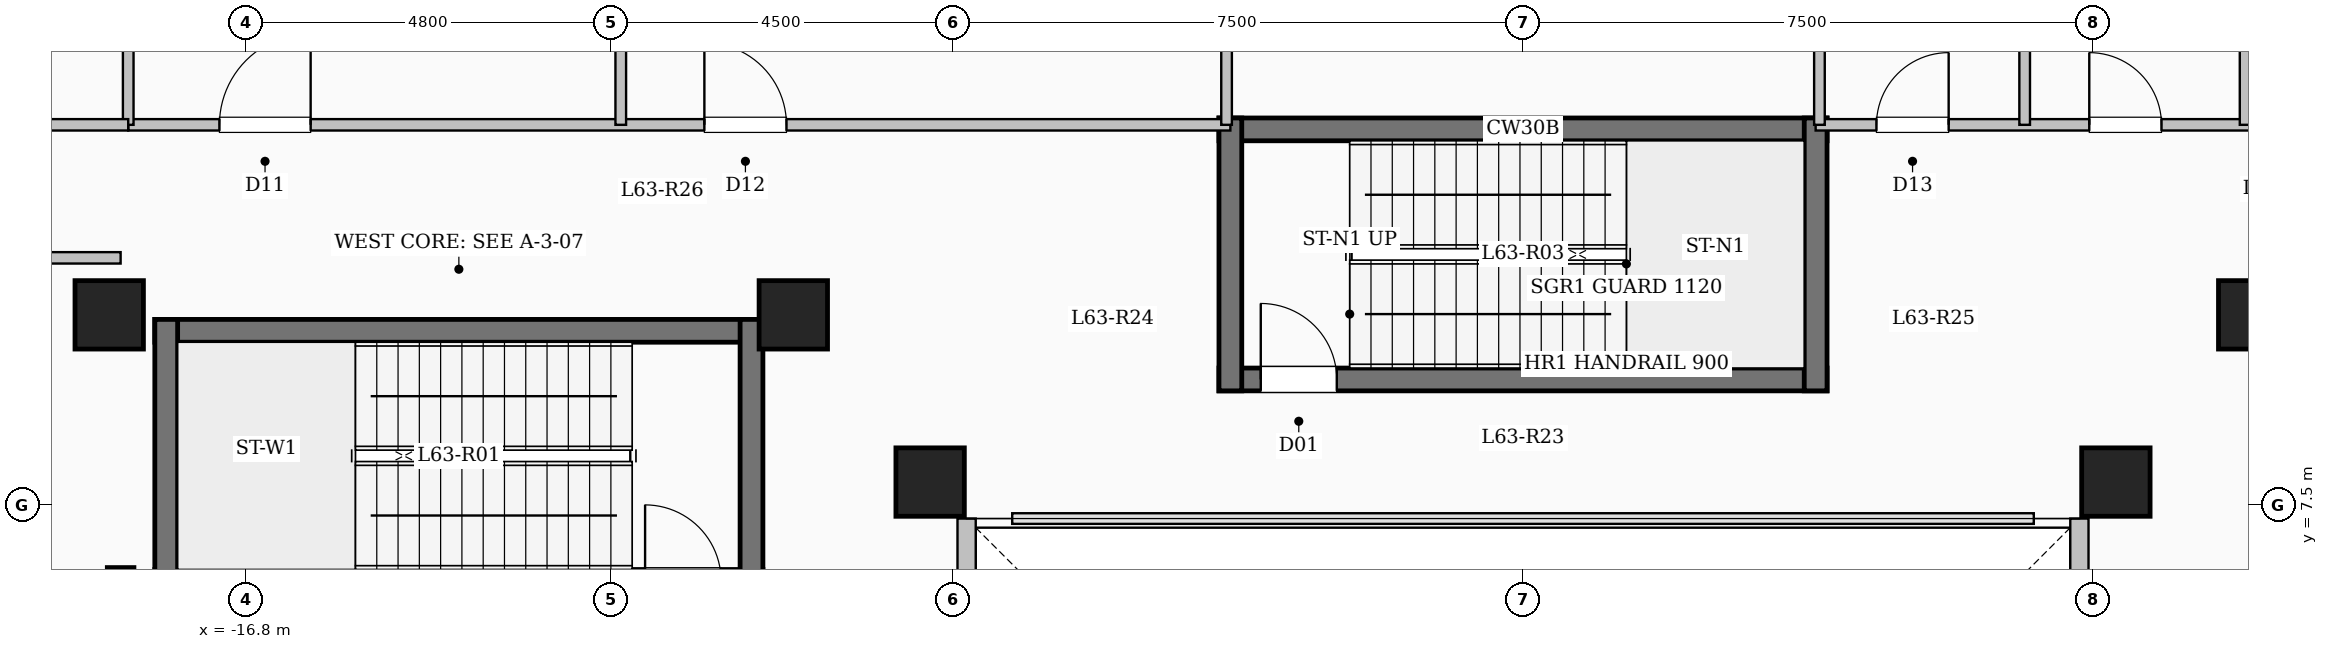
"""IFC4 building model, lengths in metres.
Left out: names, types, materials, properties, quantities, classifications, styles, units other than length and angle.
Written with IfcOpenShell. Run it as: python <this file> out.ifc"""

import sys

from ifc_helpers import new_model, si_unit, direction, frame, frame_2d, origin, origin_2d, place, context, subcontext, project, spatial, rectangle, extrude, element, fill, save


model = new_model("IFC4")
c1 = context("Model", 3, precision=1e-05, world=origin(), true_north=direction((0.0, 1.0)))
c2 = subcontext(c1, "Body", "Model", "MODEL_VIEW")
j1 = project(units=[si_unit("LENGTHUNIT", "METRE"), si_unit("PLANEANGLEUNIT", "RADIAN")], contexts=[c1])
p1 = place(None, origin())
s1 = spatial("IfcSite", under=j1, at=p1, CompositionType="ELEMENT")
p2 = place(p1, origin())
s2 = spatial("IfcBuilding", under=s1, at=p2, CompositionType="ELEMENT")
p3 = place(p2, frame((0.0, 0.0, 231.75)))
s3 = spatial("IfcBuildingStorey", under=s2, at=p3, CompositionType="ELEMENT", Elevation=231.75)
for number, where, z_axis, x_axis in (
    (1, (-7.8, 7.8, 0.0), (0.0, 0.0, 1.0), (1.0, 0.0, 0.0)),
    (2, (7.8, 7.8, 0.0), (0.0, 0.0, 1.0), (1.0, 0.0, 0.0)),
    (3, (-9.6, 10.0, 0.0), (0.0, 0.0, 1.0), (1.0, 0.0, 0.0)),
    (4, (9.6, 10.0, 0.0), (0.0, 0.0, 1.0), (1.0, 0.0, 0.0)),
    (5, (-18.6, 10.0, 0.0), (0.0, 0.0, 1.0), (1.0, 0.0, 0.0)),
):
    element("IfcColumn", number, at=place(p3, frame(where, z_axis=z_axis, x_axis=x_axis)), inside=s3, PredefinedType="COLUMN", context=c2, shape_type="SweptSolid", body=[
        extrude(rectangle(XDim=0.9, YDim=0.9, at=origin_2d()), origin(), (0.0, 0.0, 1.0), 4.65),
    ])
p4 = place(p3, frame((7.32, -7.32, 0.0), z_axis=(0.0, 0.0, 1.0), x_axis=(0.0, 1.0, 0.0)))
e6 = element("IfcWall", 6, at=p4, inside=s3, PredefinedType="SOLIDWALL", context=c2, shape_type="SweptSolid", body=[
    extrude(rectangle(XDim=14.64, YDim=0.24, at=frame_2d((7.32, 0.0))), origin(), (0.0, 0.0, 1.0), 4.35),
])
p5 = place(p4, frame((6.62, 0.0, 0.95)))
e7 = element("IfcOpeningElement", 7, at=p5, cuts=e6, PredefinedType="OPENING", context=c2, shape_type="SweptSolid", body=[
    extrude(rectangle(XDim=1.4, YDim=1.5, at=frame_2d((0.7, 0.75))), frame((0.0, 0.13, 0.0), z_axis=(0.0, -1.0, 0.0), x_axis=(1.0, 0.0, 0.0)), (0.0, 0.0, 1.0), 0.26),
])
p6 = place(p3, frame((-7.32, 7.32, 0.0), z_axis=(0.0, 0.0, 1.0), x_axis=(0.0, -1.0, 0.0)))
e8 = element("IfcWall", 8, at=p6, inside=s3, PredefinedType="SOLIDWALL", context=c2, shape_type="SweptSolid", body=[
    extrude(rectangle(XDim=14.64, YDim=0.24, at=frame_2d((7.32, 0.0))), origin(), (0.0, 0.0, 1.0), 4.35),
])
p7 = place(p6, frame((6.62, 0.0, 0.95)))
e9 = element("IfcOpeningElement", 9, at=p7, cuts=e8, PredefinedType="OPENING", context=c2, shape_type="SweptSolid", body=[
    extrude(rectangle(XDim=1.4, YDim=1.5, at=frame_2d((0.7, 0.75))), frame((0.0, 0.13, 0.0), z_axis=(0.0, -1.0, 0.0), x_axis=(1.0, 0.0, 0.0)), (0.0, 0.0, 1.0), 0.26),
])
p8 = place(p3, frame((-18.0, 9.79, 0.0), z_axis=(0.0, 0.0, 1.0), x_axis=(1.0, 0.0, 0.0)))
e10 = element("IfcWall", 10, at=p8, inside=s3, PredefinedType="SHEAR", context=c2, shape_type="SweptSolid", body=[
    extrude(rectangle(XDim=8.0, YDim=0.3, at=frame_2d((4.0, 0.0))), origin(), (0.0, 0.0, 1.0), 4.65),
])
p9 = place(p3, frame((-18.0, 6.5, 0.0), z_axis=(0.0, 0.0, 1.0), x_axis=(1.0, 0.0, 0.0)))
e11 = element("IfcWall", 11, at=p9, inside=s3, PredefinedType="SHEAR", context=c2, shape_type="SweptSolid", body=[
    extrude(rectangle(XDim=8.0, YDim=0.3, at=frame_2d((4.0, 0.0))), origin(), (0.0, 0.0, 1.0), 4.65),
])
p10 = place(p9, frame((6.45, 0.0, 0.0)))
e12 = element("IfcOpeningElement", 12, at=p10, cuts=e11, PredefinedType="OPENING", context=c2, shape_type="SweptSolid", body=[
    extrude(rectangle(XDim=1.0, YDim=2.15, at=frame_2d((0.5, 1.075))), frame((0.0, 0.16, 0.0), z_axis=(0.0, -1.0, 0.0), x_axis=(1.0, 0.0, 0.0)), (0.0, 0.0, 1.0), 0.32),
])
for number, where, z_axis, x_axis in (
    (13, (-17.85, 6.35, 0.0), (0.0, 0.0, 1.0), (0.0, 1.0, 0.0)),
    (14, (-10.15, 6.35, 0.0), (0.0, 0.0, 1.0), (0.0, 1.0, 0.0)),
):
    element("IfcWall", number, at=place(p3, frame(where, z_axis=z_axis, x_axis=x_axis)), inside=s3, PredefinedType="SHEAR", context=c2, shape_type="SweptSolid", body=[
        extrude(rectangle(XDim=3.59, YDim=0.3, at=frame_2d((1.795, 0.0))), origin(), (0.0, 0.0, 1.0), 4.65),
    ])
p11 = place(p3, frame((-4.0, 12.44, 0.0), z_axis=(0.0, 0.0, 1.0), x_axis=(1.0, 0.0, 0.0)))
e15 = element("IfcWall", 15, at=p11, inside=s3, PredefinedType="SHEAR", context=c2, shape_type="SweptSolid", body=[
    extrude(rectangle(XDim=8.0, YDim=0.3, at=frame_2d((4.0, 0.0))), origin(), (0.0, 0.0, 1.0), 4.65),
])
p12 = place(p3, frame((-4.0, 9.15, 0.0), z_axis=(0.0, 0.0, 1.0), x_axis=(1.0, 0.0, 0.0)))
e16 = element("IfcWall", 16, at=p12, inside=s3, PredefinedType="SHEAR", context=c2, shape_type="SweptSolid", body=[
    extrude(rectangle(XDim=8.0, YDim=0.3, at=frame_2d((4.0, 0.0))), origin(), (0.0, 0.0, 1.0), 4.65),
])
p13 = place(p12, frame((0.55, 0.0, 0.0)))
e17 = element("IfcOpeningElement", 17, at=p13, cuts=e16, PredefinedType="OPENING", context=c2, shape_type="SweptSolid", body=[
    extrude(rectangle(XDim=1.0, YDim=2.15, at=frame_2d((0.5, 1.075))), frame((0.0, 0.16, 0.0), z_axis=(0.0, -1.0, 0.0), x_axis=(1.0, 0.0, 0.0)), (0.0, 0.0, 1.0), 0.32),
])
for number, where, z_axis, x_axis in (
    (18, (-3.85, 9.0, 0.0), (0.0, 0.0, 1.0), (0.0, 1.0, 0.0)),
    (19, (3.85, 9.0, 0.0), (0.0, 0.0, 1.0), (0.0, 1.0, 0.0)),
):
    element("IfcWall", number, at=place(p3, frame(where, z_axis=z_axis, x_axis=x_axis)), inside=s3, PredefinedType="SHEAR", context=c2, shape_type="SweptSolid", body=[
        extrude(rectangle(XDim=3.59, YDim=0.3, at=frame_2d((1.795, 0.0))), origin(), (0.0, 0.0, 1.0), 4.65),
    ])
p14 = place(p3, frame((-18.45, -7.375, 0.0), z_axis=(0.0, 0.0, 1.0), x_axis=(0.0, 1.0, 0.0)))
e20 = element("IfcWall", 20, at=p14, inside=s3, PredefinedType="SHEAR", context=c2, shape_type="SweptSolid", body=[
    extrude(rectangle(XDim=14.05, YDim=0.35, at=frame_2d((7.025, 0.0))), origin(), (0.0, 0.0, 1.0), 4.65),
])
p15 = place(p3, frame((-18.35, 12.5, 0.0), z_axis=(0.0, 0.0, 1.0), x_axis=(1.0, 0.0, 0.0)))
e21 = element("IfcWall", 21, at=p15, inside=s3, PredefinedType="PARTITIONING", context=c2, shape_type="SweptSolid", body=[
    extrude(rectangle(XDim=14.5, YDim=0.15, at=frame_2d((7.25, 0.0))), origin(), (0.0, 0.0, 1.0), 4.35),
])
p16 = place(p15, frame((1.2, 0.0, 0.0)))
e22 = element("IfcOpeningElement", 22, at=p16, cuts=e21, PredefinedType="OPENING", context=c2, shape_type="SweptSolid", body=[
    extrude(rectangle(XDim=1.2, YDim=2.15, at=frame_2d((0.6, 1.075))), frame((0.0, 0.085, 0.0), z_axis=(0.0, -1.0, 0.0), x_axis=(1.0, 0.0, 0.0)), (0.0, 0.0, 1.0), 0.17),
])
p17 = place(p15, frame((7.58, 0.0, 0.0)))
e23 = element("IfcOpeningElement", 23, at=p17, cuts=e21, PredefinedType="OPENING", context=c2, shape_type="SweptSolid", body=[
    extrude(rectangle(XDim=1.08, YDim=2.15, at=frame_2d((0.54, 1.075))), frame((0.0, 0.085, 0.0), z_axis=(0.0, -1.0, 0.0), x_axis=(1.0, 0.0, 0.0)), (0.0, 0.0, 1.0), 0.17),
])
p18 = place(p3, frame((3.85, 12.5, 0.0), z_axis=(0.0, 0.0, 1.0), x_axis=(1.0, 0.0, 0.0)))
e24 = element("IfcWall", 24, at=p18, inside=s3, PredefinedType="PARTITIONING", context=c2, shape_type="SweptSolid", body=[
    extrude(rectangle(XDim=14.5, YDim=0.15, at=frame_2d((7.25, 0.0))), origin(), (0.0, 0.0, 1.0), 4.35),
])
p19 = place(p18, frame((0.8, 0.0, 0.0)))
e25 = element("IfcOpeningElement", 25, at=p19, cuts=e24, PredefinedType="OPENING", context=c2, shape_type="SweptSolid", body=[
    extrude(rectangle(XDim=0.95, YDim=2.15, at=frame_2d((0.475, 1.075))), frame((0.0, 0.085, 0.0), z_axis=(0.0, -1.0, 0.0), x_axis=(1.0, 0.0, 0.0)), (0.0, 0.0, 1.0), 0.17),
])
p20 = place(p18, frame((3.6, 0.0, 0.0)))
e26 = element("IfcOpeningElement", 26, at=p20, cuts=e24, PredefinedType="OPENING", context=c2, shape_type="SweptSolid", body=[
    extrude(rectangle(XDim=0.95, YDim=2.15, at=frame_2d((0.475, 1.075))), frame((0.0, 0.085, 0.0), z_axis=(0.0, -1.0, 0.0), x_axis=(1.0, 0.0, 0.0)), (0.0, 0.0, 1.0), 0.17),
])
p21 = place(p18, frame((6.55, 0.0, 0.0)))
e27 = element("IfcOpeningElement", 27, at=p21, cuts=e24, PredefinedType="OPENING", context=c2, shape_type="SweptSolid", body=[
    extrude(rectangle(XDim=1.08, YDim=2.15, at=frame_2d((0.54, 1.075))), frame((0.0, 0.085, 0.0), z_axis=(0.0, -1.0, 0.0), x_axis=(1.0, 0.0, 0.0)), (0.0, 0.0, 1.0), 0.17),
])
p22 = place(p18, frame((10.29, 0.0, 0.0)))
e28 = element("IfcOpeningElement", 28, at=p22, cuts=e24, PredefinedType="OPENING", context=c2, shape_type="SweptSolid", body=[
    extrude(rectangle(XDim=1.2, YDim=2.15, at=frame_2d((0.6, 1.075))), frame((0.0, 0.085, 0.0), z_axis=(0.0, -1.0, 0.0), x_axis=(1.0, 0.0, 0.0)), (0.0, 0.0, 1.0), 0.17),
])
for number, where, z_axis, x_axis in (
    (29, (-3.9, 12.5, 0.0), (0.0, 0.0, 1.0), (0.0, 1.0, 0.0)),
    (30, (3.9, 12.5, 0.0), (0.0, 0.0, 1.0), (0.0, 1.0, 0.0)),
):
    element("IfcWall", number, at=place(p3, frame(where, z_axis=z_axis, x_axis=x_axis)), inside=s3, PredefinedType="PARTITIONING", context=c2, shape_type="SweptSolid", body=[
        extrude(rectangle(XDim=9.88, YDim=0.14, at=frame_2d((4.94, 0.0))), origin(), (0.0, 0.0, 1.0), 4.35),
    ])
p23 = place(p3, frame((-11.87, 12.5, 0.0), z_axis=(0.0, 0.0, 1.0), x_axis=(0.0, 1.0, 0.0)))
e31 = element("IfcWall", 31, at=p23, inside=s3, PredefinedType="PARTITIONING", context=c2, shape_type="SweptSolid", body=[
    extrude(rectangle(XDim=8.4, YDim=0.14, at=frame_2d((4.2, 0.0))), origin(), (0.0, 0.0, 1.0), 4.35),
])
p24 = place(p3, frame((6.6, 12.5, 0.0), z_axis=(0.0, 0.0, 1.0), x_axis=(0.0, 1.0, 0.0)))
e32 = element("IfcWall", 32, at=p24, inside=s3, PredefinedType="PARTITIONING", context=c2, shape_type="SweptSolid", body=[
    extrude(rectangle(XDim=9.485, YDim=0.14, at=frame_2d((4.743, 0.0))), origin(), (0.0, 0.0, 1.0), 4.35),
])
p25 = place(p3, frame((9.5, 12.5, 0.0), z_axis=(0.0, 0.0, 1.0), x_axis=(0.0, 1.0, 0.0)))
e33 = element("IfcWall", 33, at=p25, inside=s3, PredefinedType="PARTITIONING", context=c2, shape_type="SweptSolid", body=[
    extrude(rectangle(XDim=8.77, YDim=0.14, at=frame_2d((4.385, 0.0))), origin(), (0.0, 0.0, 1.0), 4.35),
])
p26 = place(p3, frame((-23.58, 10.75, 0.0), z_axis=(0.0, 0.0, 1.0), x_axis=(1.0, 0.0, 0.0)))
e34 = element("IfcWall", 34, at=p26, inside=s3, PredefinedType="PARTITIONING", context=c2, shape_type="SweptSolid", body=[
    extrude(rectangle(XDim=5.13, YDim=0.15, at=frame_2d((2.565, 0.0))), origin(), (0.0, 0.0, 1.0), 4.35),
])
p27 = place(p3, frame((-18.35, 12.5, 0.0), z_axis=(0.0, 0.0, 1.0), x_axis=(0.0, 1.0, 0.0)))
e35 = element("IfcWall", 35, at=p27, inside=s3, PredefinedType="PARTITIONING", context=c2, shape_type="SweptSolid", body=[
    extrude(rectangle(XDim=4.75, YDim=0.14, at=frame_2d((2.375, 0.0))), origin(), (0.0, 0.0, 1.0), 4.35),
])
p28 = place(p3, frame((-23.58, 12.5, 0.0), z_axis=(0.0, 0.0, 1.0), x_axis=(1.0, 0.0, 0.0)))
e36 = element("IfcWall", 36, at=p28, inside=s3, PredefinedType="PARTITIONING", context=c2, shape_type="SweptSolid", body=[
    extrude(rectangle(XDim=5.23, YDim=0.15, at=frame_2d((2.615, 0.0))), origin(), (0.0, 0.0, 1.0), 4.35),
])
p29 = place(p28, frame((2.14, 0.0, 0.0)))
e37 = element("IfcOpeningElement", 37, at=p29, cuts=e36, PredefinedType="OPENING", context=c2, shape_type="SweptSolid", body=[
    extrude(rectangle(XDim=0.95, YDim=2.15, at=frame_2d((0.475, 1.075))), frame((0.0, 0.085, 0.0), z_axis=(0.0, -1.0, 0.0), x_axis=(1.0, 0.0, 0.0)), (0.0, 0.0, 1.0), 0.17),
])
p30 = place(p13, origin())
e38 = element("IfcDoor", 38, at=p30, inside=s3, OperationType="SINGLE_SWING_LEFT", PredefinedType="DOOR", context=c2, shape_type="SweptSolid", body=[
    extrude(rectangle(XDim=1.0, YDim=2.15, at=frame_2d((0.5, 1.075))), frame((0.0, 0.025, 0.0), z_axis=(0.0, -1.0, 0.0), x_axis=(1.0, 0.0, 0.0)), (0.0, 0.0, 1.0), 0.05),
])
fill(e17, e38)
p31 = place(p16, origin())
e39 = element("IfcDoor", 39, at=p31, inside=s3, OperationType="SINGLE_SWING_RIGHT", PredefinedType="DOOR", context=c2, shape_type="SweptSolid", body=[
    extrude(rectangle(XDim=1.2, YDim=2.15, at=frame_2d((0.6, 1.075))), frame((0.0, 0.025, 0.0), z_axis=(0.0, -1.0, 0.0), x_axis=(1.0, 0.0, 0.0)), (0.0, 0.0, 1.0), 0.05),
])
fill(e22, e39)
p32 = place(p17, origin())
e40 = element("IfcDoor", 40, at=p32, inside=s3, OperationType="SINGLE_SWING_LEFT", PredefinedType="DOOR", context=c2, shape_type="SweptSolid", body=[
    extrude(rectangle(XDim=1.08, YDim=2.15, at=frame_2d((0.54, 1.075))), frame((0.0, 0.025, 0.0), z_axis=(0.0, -1.0, 0.0), x_axis=(1.0, 0.0, 0.0)), (0.0, 0.0, 1.0), 0.05),
])
fill(e23, e40)
p33 = place(p19, origin())
e41 = element("IfcDoor", 41, at=p33, inside=s3, OperationType="SINGLE_SWING_RIGHT", PredefinedType="DOOR", context=c2, shape_type="SweptSolid", body=[
    extrude(rectangle(XDim=0.95, YDim=2.15, at=frame_2d((0.475, 1.075))), frame((0.0, 0.025, 0.0), z_axis=(0.0, -1.0, 0.0), x_axis=(1.0, 0.0, 0.0)), (0.0, 0.0, 1.0), 0.05),
])
fill(e25, e41)
p34 = place(p20, origin())
e42 = element("IfcDoor", 42, at=p34, inside=s3, OperationType="SINGLE_SWING_LEFT", PredefinedType="DOOR", context=c2, shape_type="SweptSolid", body=[
    extrude(rectangle(XDim=0.95, YDim=2.15, at=frame_2d((0.475, 1.075))), frame((0.0, 0.025, 0.0), z_axis=(0.0, -1.0, 0.0), x_axis=(1.0, 0.0, 0.0)), (0.0, 0.0, 1.0), 0.05),
])
fill(e26, e42)
save(model, sys.argv[1])
